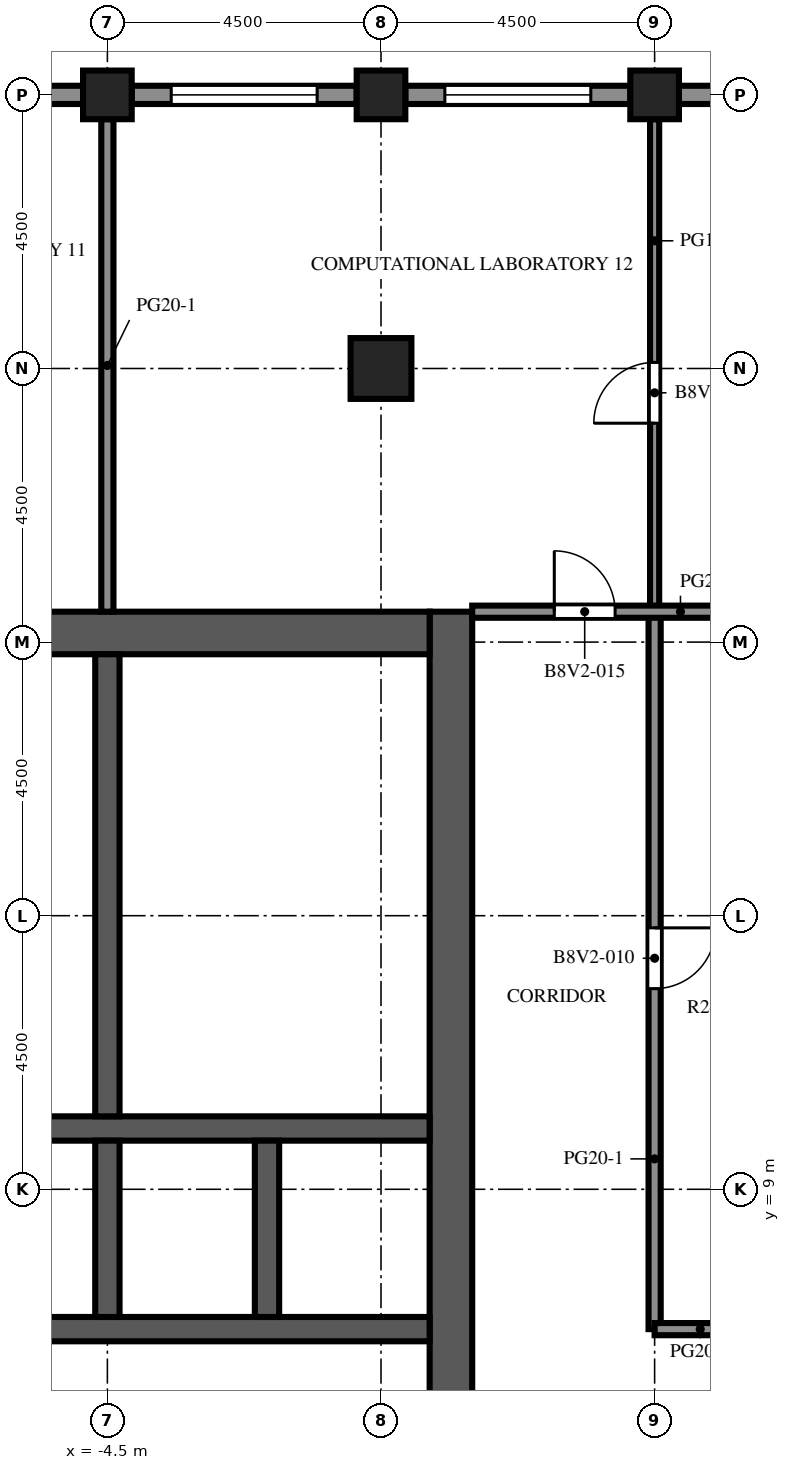
"""IFC4 building model, lengths in metres.
Left out: names, types, materials, properties, quantities, classifications, styles, units other than length and angle.
Written with IfcOpenShell. Run it as: python <this file> out.ifc"""

import sys

from ifc_helpers import new_model, si_unit, direction, frame, frame_2d, origin, origin_2d, place, context, subcontext, project, spatial, rectangle, extrude, element, fill, save


model = new_model("IFC4")
c1 = context("Model", 3, precision=1e-05, world=origin(), true_north=direction((0.0, 1.0)))
c2 = subcontext(c1, "Body", "Model", "MODEL_VIEW")
j1 = project(units=[si_unit("LENGTHUNIT", "METRE"), si_unit("PLANEANGLEUNIT", "RADIAN")], contexts=[c1])
p1 = place(None, origin())
s1 = spatial("IfcSite", under=j1, at=p1, CompositionType="ELEMENT")
p2 = place(p1, origin())
s2 = spatial("IfcBuilding", under=s1, at=p2, CompositionType="ELEMENT")
p3 = place(p2, frame((0.0, 0.0, 286.8)))
s3 = spatial("IfcBuildingStorey", under=s2, at=p3, CompositionType="ELEMENT", Elevation=286.8)
for number, where, z_axis, x_axis in (
    (1, (-4.5, 27.0, 0.0), (0.0, 0.0, 1.0), (1.0, 0.0, 0.0)),
    (2, (0.0, 27.0, 0.0), (0.0, 0.0, 1.0), (1.0, 0.0, 0.0)),
    (3, (4.5, 27.0, 0.0), (0.0, 0.0, 1.0), (1.0, 0.0, 0.0)),
):
    element("IfcColumn", number, at=place(p3, frame(where, z_axis=z_axis, x_axis=x_axis)), inside=s3, PredefinedType="COLUMN", context=c2, shape_type="SweptSolid", body=[
        extrude(rectangle(XDim=0.8, YDim=0.8, at=origin_2d()), origin(), (0.0, 0.0, 1.0), 4.1),
    ])
p4 = place(p3, frame((0.0, 22.5, 0.0), z_axis=(0.0, 0.0, 1.0), x_axis=(1.0, 0.0, 0.0)))
e4 = element("IfcColumn", 4, at=p4, inside=s3, PredefinedType="COLUMN", context=c2, shape_type="SweptSolid", body=[
    extrude(rectangle(XDim=1.0, YDim=1.0, at=origin_2d()), origin(), (0.0, 0.0, 1.0), 4.1),
])
p5 = place(p3, frame((1.15, -9.0, 0.0), z_axis=(0.0, 0.0, 1.0), x_axis=(0.0, 1.0, 0.0)))
e5 = element("IfcWall", 5, at=p5, inside=s3, PredefinedType="SHEAR", context=c2, shape_type="SweptSolid", body=[
    extrude(rectangle(XDim=27.5, YDim=0.7, at=frame_2d((13.75, 0.0))), origin(), (0.0, 0.0, 1.0), 4.1),
])
p6 = place(p5, frame((12.55, 0.0, 0.0)))
e6 = element("IfcOpeningElement", 6, at=p6, cuts=e5, PredefinedType="OPENING", context=c2, shape_type="SweptSolid", body=[
    extrude(rectangle(XDim=2.4, YDim=2.4, at=frame_2d((1.2, 1.2))), frame((0.0, 0.36, 0.0), z_axis=(0.0, -1.0, 0.0), x_axis=(1.0, 0.0, 0.0)), (0.0, 0.0, 1.0), 0.72),
])
p7 = place(p5, frame((3.9, 0.0, 0.0)))
e7 = element("IfcOpeningElement", 7, at=p7, cuts=e5, PredefinedType="OPENING", context=c2, shape_type="SweptSolid", body=[
    extrude(rectangle(XDim=1.2, YDim=2.1, at=frame_2d((0.6, 1.05))), frame((0.0, 0.36, 0.0), z_axis=(0.0, -1.0, 0.0), x_axis=(1.0, 0.0, 0.0)), (0.0, 0.0, 1.0), 0.72),
])
p8 = place(p5, frame((22.4, 0.0, 0.0)))
e8 = element("IfcOpeningElement", 8, at=p8, cuts=e5, PredefinedType="OPENING", context=c2, shape_type="SweptSolid", body=[
    extrude(rectangle(XDim=1.2, YDim=2.1, at=frame_2d((0.6, 1.05))), frame((0.0, 0.36, 0.0), z_axis=(0.0, -1.0, 0.0), x_axis=(1.0, 0.0, 0.0)), (0.0, 0.0, 1.0), 0.72),
])
p9 = place(p3, frame((-9.8, 18.15, 0.0), z_axis=(0.0, 0.0, 1.0), x_axis=(1.0, 0.0, 0.0)))
e9 = element("IfcWall", 9, at=p9, inside=s3, PredefinedType="SHEAR", context=c2, shape_type="SweptSolid", body=[
    extrude(rectangle(XDim=10.6, YDim=0.7, at=frame_2d((5.3, 0.0))), origin(), (0.0, 0.0, 1.0), 4.1),
])
p10 = place(p3, frame((-9.8, 6.7, 0.0), z_axis=(0.0, 0.0, 1.0), x_axis=(1.0, 0.0, 0.0)))
e10 = element("IfcWall", 10, at=p10, inside=s3, PredefinedType="SHEAR", context=c2, shape_type="SweptSolid", body=[
    extrude(rectangle(XDim=10.6, YDim=0.4, at=frame_2d((5.3, 0.0))), origin(), (0.0, 0.0, 1.0), 4.1),
])
p11 = place(p10, frame((3.438, 0.0, 0.0)))
e11 = element("IfcOpeningElement", 11, at=p11, cuts=e10, PredefinedType="OPENING", context=c2, shape_type="SweptSolid", body=[
    extrude(rectangle(XDim=1.1, YDim=2.1, at=frame_2d((0.55, 1.05))), frame((0.0, 0.21, 0.0), z_axis=(0.0, -1.0, 0.0), x_axis=(1.0, 0.0, 0.0)), (0.0, 0.0, 1.0), 0.42),
])
p12 = place(p10, frame((6.062, 0.0, 0.0)))
e12 = element("IfcOpeningElement", 12, at=p12, cuts=e10, PredefinedType="OPENING", context=c2, shape_type="SweptSolid", body=[
    extrude(rectangle(XDim=1.1, YDim=2.1, at=frame_2d((0.55, 1.05))), frame((0.0, 0.21, 0.0), z_axis=(0.0, -1.0, 0.0), x_axis=(1.0, 0.0, 0.0)), (0.0, 0.0, 1.0), 0.42),
])
p13 = place(p10, frame((8.812, 0.0, 0.0)))
e13 = element("IfcOpeningElement", 13, at=p13, cuts=e10, PredefinedType="OPENING", context=c2, shape_type="SweptSolid", body=[
    extrude(rectangle(XDim=1.1, YDim=2.1, at=frame_2d((0.55, 1.05))), frame((0.0, 0.21, 0.0), z_axis=(0.0, -1.0, 0.0), x_axis=(1.0, 0.0, 0.0)), (0.0, 0.0, 1.0), 0.42),
])
p14 = place(p10, frame((0.738, 0.0, 0.0)))
e14 = element("IfcOpeningElement", 14, at=p14, cuts=e10, PredefinedType="OPENING", context=c2, shape_type="SweptSolid", body=[
    extrude(rectangle(XDim=1.0, YDim=2.1, at=frame_2d((0.5, 1.05))), frame((0.0, 0.21, 0.0), z_axis=(0.0, -1.0, 0.0), x_axis=(1.0, 0.0, 0.0)), (0.0, 0.0, 1.0), 0.42),
])
p15 = place(p3, frame((-9.8, 10.0, 0.0), z_axis=(0.0, 0.0, 1.0), x_axis=(1.0, 0.0, 0.0)))
e15 = element("IfcWall", 15, at=p15, inside=s3, PredefinedType="SHEAR", context=c2, shape_type="SweptSolid", body=[
    extrude(rectangle(XDim=10.6, YDim=0.4, at=frame_2d((5.3, 0.0))), origin(), (0.0, 0.0, 1.0), 4.1),
])
for number, where, z_axis, x_axis in (
    (16, (-4.5, 6.9, 0.0), (0.0, 0.0, 1.0), (0.0, 1.0, 0.0)),
    (17, (-1.875, 6.9, 0.0), (0.0, 0.0, 1.0), (0.0, 1.0, 0.0)),
):
    element("IfcWall", number, at=place(p3, frame(where, z_axis=z_axis, x_axis=x_axis)), inside=s3, PredefinedType="SHEAR", context=c2, shape_type="SweptSolid", body=[
        extrude(rectangle(XDim=2.9, YDim=0.4, at=frame_2d((1.45, 0.0))), origin(), (0.0, 0.0, 1.0), 4.1),
    ])
p16 = place(p3, frame((-4.5, 10.2, 0.0), z_axis=(0.0, 0.0, 1.0), x_axis=(0.0, 1.0, 0.0)))
e18 = element("IfcWall", 18, at=p16, inside=s3, PredefinedType="SHEAR", context=c2, shape_type="SweptSolid", body=[
    extrude(rectangle(XDim=7.6, YDim=0.4, at=frame_2d((3.8, 0.0))), origin(), (0.0, 0.0, 1.0), 4.1),
])
p17 = place(p3, frame((4.9, 27.0, 0.0), z_axis=(0.0, 0.0, 1.0), x_axis=(1.0, 0.0, 0.0)))
e19 = element("IfcWall", 19, at=p17, inside=s3, PredefinedType="SOLIDWALL", context=c2, shape_type="SweptSolid", body=[
    extrude(rectangle(XDim=3.7, YDim=0.3, at=frame_2d((1.85, 0.0))), origin(), (0.0, 0.0, 1.0), 2.85),
])
p18 = place(p17, frame((0.65, 0.0, 0.8)))
e20 = element("IfcOpeningElement", 20, at=p18, cuts=e19, PredefinedType="OPENING", context=c2, shape_type="SweptSolid", body=[
    extrude(rectangle(XDim=2.4, YDim=1.7, at=frame_2d((1.2, 0.85))), frame((0.0, 0.16, 0.0), z_axis=(0.0, -1.0, 0.0), x_axis=(1.0, 0.0, 0.0)), (0.0, 0.0, 1.0), 0.32),
])
p19 = place(p3, frame((0.4, 27.0, 0.0), z_axis=(0.0, 0.0, 1.0), x_axis=(1.0, 0.0, 0.0)))
e21 = element("IfcWall", 21, at=p19, inside=s3, PredefinedType="SOLIDWALL", context=c2, shape_type="SweptSolid", body=[
    extrude(rectangle(XDim=3.7, YDim=0.3, at=frame_2d((1.85, 0.0))), origin(), (0.0, 0.0, 1.0), 2.85),
])
p20 = place(p19, frame((0.65, 0.0, 0.8)))
e22 = element("IfcOpeningElement", 22, at=p20, cuts=e21, PredefinedType="OPENING", context=c2, shape_type="SweptSolid", body=[
    extrude(rectangle(XDim=2.4, YDim=1.7, at=frame_2d((1.2, 0.85))), frame((0.0, 0.16, 0.0), z_axis=(0.0, -1.0, 0.0), x_axis=(1.0, 0.0, 0.0)), (0.0, 0.0, 1.0), 0.32),
])
p21 = place(p3, frame((-4.1, 27.0, 0.0), z_axis=(0.0, 0.0, 1.0), x_axis=(1.0, 0.0, 0.0)))
e23 = element("IfcWall", 23, at=p21, inside=s3, PredefinedType="SOLIDWALL", context=c2, shape_type="SweptSolid", body=[
    extrude(rectangle(XDim=3.7, YDim=0.3, at=frame_2d((1.85, 0.0))), origin(), (0.0, 0.0, 1.0), 2.85),
])
p22 = place(p21, frame((0.65, 0.0, 0.8)))
e24 = element("IfcOpeningElement", 24, at=p22, cuts=e23, PredefinedType="OPENING", context=c2, shape_type="SweptSolid", body=[
    extrude(rectangle(XDim=2.4, YDim=1.7, at=frame_2d((1.2, 0.85))), frame((0.0, 0.16, 0.0), z_axis=(0.0, -1.0, 0.0), x_axis=(1.0, 0.0, 0.0)), (0.0, 0.0, 1.0), 0.32),
])
p23 = place(p3, frame((-8.6, 27.0, 0.0), z_axis=(0.0, 0.0, 1.0), x_axis=(1.0, 0.0, 0.0)))
e25 = element("IfcWall", 25, at=p23, inside=s3, PredefinedType="SOLIDWALL", context=c2, shape_type="SweptSolid", body=[
    extrude(rectangle(XDim=3.7, YDim=0.3, at=frame_2d((1.85, 0.0))), origin(), (0.0, 0.0, 1.0), 2.85),
])
p24 = place(p23, frame((0.65, 0.0, 0.8)))
e26 = element("IfcOpeningElement", 26, at=p24, cuts=e25, PredefinedType="OPENING", context=c2, shape_type="SweptSolid", body=[
    extrude(rectangle(XDim=2.4, YDim=1.7, at=frame_2d((1.2, 0.85))), frame((0.0, 0.16, 0.0), z_axis=(0.0, -1.0, 0.0), x_axis=(1.0, 0.0, 0.0)), (0.0, 0.0, 1.0), 0.32),
])
p25 = place(p3, frame((-0.6, 10.2, 0.0), z_axis=(0.0, 0.0, 1.0), x_axis=(0.0, 1.0, 0.0)))
e27 = element("IfcWall", 27, at=p25, inside=s3, PredefinedType="PARTITIONING", context=c2, shape_type="SweptSolid", body=[
    extrude(rectangle(XDim=2.28, YDim=0.1, at=frame_2d((1.14, 0.0))), origin(), (0.0, 0.0, 1.0), 3.65),
])
p26 = place(p25, frame((0.64, 0.0, 0.0)))
e28 = element("IfcOpeningElement", 28, at=p26, cuts=e27, PredefinedType="OPENING", context=c2, shape_type="SweptSolid", body=[
    extrude(rectangle(XDim=1.0, YDim=2.1, at=frame_2d((0.5, 1.05))), frame((0.0, 0.06, 0.0), z_axis=(0.0, -1.0, 0.0), x_axis=(1.0, 0.0, 0.0)), (0.0, 0.0, 1.0), 0.12),
])
p27 = place(p3, frame((-0.6, 12.48, 0.0), z_axis=(0.0, 0.0, 1.0), x_axis=(0.0, 1.0, 0.0)))
e29 = element("IfcWall", 29, at=p27, inside=s3, PredefinedType="PARTITIONING", context=c2, shape_type="SweptSolid", body=[
    extrude(rectangle(XDim=2.432, YDim=0.1, at=frame_2d((1.216, 0.0))), origin(), (0.0, 0.0, 1.0), 3.65),
])
p28 = place(p27, frame((0.716, 0.0, 0.0)))
e30 = element("IfcOpeningElement", 30, at=p28, cuts=e29, PredefinedType="OPENING", context=c2, shape_type="SweptSolid", body=[
    extrude(rectangle(XDim=1.0, YDim=2.1, at=frame_2d((0.5, 1.05))), frame((0.0, 0.06, 0.0), z_axis=(0.0, -1.0, 0.0), x_axis=(1.0, 0.0, 0.0)), (0.0, 0.0, 1.0), 0.12),
])
p29 = place(p3, frame((-0.6, 14.912, 0.0), z_axis=(0.0, 0.0, 1.0), x_axis=(0.0, 1.0, 0.0)))
e31 = element("IfcWall", 31, at=p29, inside=s3, PredefinedType="PARTITIONING", context=c2, shape_type="SweptSolid", body=[
    extrude(rectangle(XDim=2.888, YDim=0.1, at=frame_2d((1.444, 0.0))), origin(), (0.0, 0.0, 1.0), 3.65),
])
p30 = place(p29, frame((0.944, 0.0, 0.0)))
e32 = element("IfcOpeningElement", 32, at=p30, cuts=e31, PredefinedType="OPENING", context=c2, shape_type="SweptSolid", body=[
    extrude(rectangle(XDim=1.0, YDim=2.1, at=frame_2d((0.5, 1.05))), frame((0.0, 0.06, 0.0), z_axis=(0.0, -1.0, 0.0), x_axis=(1.0, 0.0, 0.0)), (0.0, 0.0, 1.0), 0.12),
])
for number, where, z_axis, x_axis in (
    (33, (-4.3, 12.48, 0.0), (0.0, 0.0, 1.0), (1.0, 0.0, 0.0)),
    (34, (-4.3, 14.912, 0.0), (0.0, 0.0, 1.0), (1.0, 0.0, 0.0)),
):
    element("IfcWall", number, at=place(p3, frame(where, z_axis=z_axis, x_axis=x_axis)), inside=s3, PredefinedType="PARTITIONING", context=c2, shape_type="SweptSolid", body=[
        extrude(rectangle(XDim=3.7, YDim=0.1, at=frame_2d((1.85, 0.0))), origin(), (0.0, 0.0, 1.0), 3.65),
    ])
p31 = place(p3, frame((-4.5, 18.5, 0.0), z_axis=(0.0, 0.0, 1.0), x_axis=(0.0, 1.0, 0.0)))
e35 = element("IfcWall", 35, at=p31, inside=s3, PredefinedType="PARTITIONING", context=c2, shape_type="SweptSolid", body=[
    extrude(rectangle(XDim=8.1, YDim=0.2, at=frame_2d((4.05, 0.0))), origin(), (0.0, 0.0, 1.0), 3.65),
])
p32 = place(p3, frame((4.5, 26.6, 0.0), z_axis=(0.0, 0.0, 1.0), x_axis=(0.0, -1.0, 0.0)))
e36 = element("IfcWall", 36, at=p32, inside=s3, PredefinedType="PARTITIONING", context=c2, shape_type="SweptSolid", body=[
    extrude(rectangle(XDim=8.1, YDim=0.15, at=frame_2d((4.05, 0.0))), origin(), (0.0, 0.0, 1.0), 3.65),
])
p33 = place(p32, frame((4.0, 0.0, 0.0)))
e37 = element("IfcOpeningElement", 37, at=p33, cuts=e36, PredefinedType="OPENING", context=c2, shape_type="SweptSolid", body=[
    extrude(rectangle(XDim=1.0, YDim=2.1, at=frame_2d((0.5, 1.05))), frame((0.0, 0.085, 0.0), z_axis=(0.0, -1.0, 0.0), x_axis=(1.0, 0.0, 0.0)), (0.0, 0.0, 1.0), 0.17),
])
p34 = place(p3, frame((4.5, 18.5, 0.0), z_axis=(0.0, 0.0, 1.0), x_axis=(0.0, -1.0, 0.0)))
e38 = element("IfcWall", 38, at=p34, inside=s3, PredefinedType="PARTITIONING", context=c2, shape_type="SweptSolid", body=[
    extrude(rectangle(XDim=11.8, YDim=0.2, at=frame_2d((5.9, 0.0))), origin(), (0.0, 0.0, 1.0), 3.65),
])
p35 = place(p34, frame((5.2, 0.0, 0.0)))
e39 = element("IfcOpeningElement", 39, at=p35, cuts=e38, PredefinedType="OPENING", context=c2, shape_type="SweptSolid", body=[
    extrude(rectangle(XDim=1.0, YDim=2.1, at=frame_2d((0.5, 1.05))), frame((0.0, 0.11, 0.0), z_axis=(0.0, -1.0, 0.0), x_axis=(1.0, 0.0, 0.0)), (0.0, 0.0, 1.0), 0.22),
])
p36 = place(p3, frame((4.5, 6.7, 0.0), z_axis=(0.0, 0.0, 1.0), x_axis=(1.0, 0.0, 0.0)))
e40 = element("IfcWall", 40, at=p36, inside=s3, PredefinedType="PARTITIONING", context=c2, shape_type="SweptSolid", body=[
    extrude(rectangle(XDim=1.5, YDim=0.2, at=frame_2d((0.75, 0.0))), origin(), (0.0, 0.0, 1.0), 3.65),
])
p37 = place(p3, frame((1.5, 18.5, 0.0), z_axis=(0.0, 0.0, 1.0), x_axis=(1.0, 0.0, 0.0)))
e41 = element("IfcWall", 41, at=p37, inside=s3, PredefinedType="PARTITIONING", context=c2, shape_type="SweptSolid", body=[
    extrude(rectangle(XDim=4.5, YDim=0.2, at=frame_2d((2.25, 0.0))), origin(), (0.0, 0.0, 1.0), 3.65),
])
p38 = place(p37, frame((1.35, 0.0, 0.0)))
e42 = element("IfcOpeningElement", 42, at=p38, cuts=e41, PredefinedType="OPENING", context=c2, shape_type="SweptSolid", body=[
    extrude(rectangle(XDim=1.0, YDim=2.1, at=frame_2d((0.5, 1.05))), frame((0.0, 0.11, 0.0), z_axis=(0.0, -1.0, 0.0), x_axis=(1.0, 0.0, 0.0)), (0.0, 0.0, 1.0), 0.22),
])
p39 = place(p20, origin())
e43 = element("IfcWindow", 43, at=p39, inside=s3, PartitioningType="SINGLE_PANEL", PredefinedType="WINDOW", context=c2, shape_type="SweptSolid", body=[
    extrude(rectangle(XDim=2.4, YDim=1.7, at=frame_2d((1.2, 0.85))), frame((0.0, 0.03, 0.0), z_axis=(0.0, -1.0, 0.0), x_axis=(1.0, 0.0, 0.0)), (0.0, 0.0, 1.0), 0.06),
])
fill(e22, e43)
p40 = place(p22, origin())
e44 = element("IfcWindow", 44, at=p40, inside=s3, PartitioningType="SINGLE_PANEL", PredefinedType="WINDOW", context=c2, shape_type="SweptSolid", body=[
    extrude(rectangle(XDim=2.4, YDim=1.7, at=frame_2d((1.2, 0.85))), frame((0.0, 0.03, 0.0), z_axis=(0.0, -1.0, 0.0), x_axis=(1.0, 0.0, 0.0)), (0.0, 0.0, 1.0), 0.06),
])
fill(e24, e44)
p41 = place(p11, origin())
e45 = element("IfcDoor", 45, at=p41, inside=s3, OperationType="DOUBLE_DOOR_SLIDING", PredefinedType="DOOR", context=c2, shape_type="SweptSolid", body=[
    extrude(rectangle(XDim=1.1, YDim=2.1, at=frame_2d((0.55, 1.05))), frame((0.0, 0.025, 0.0), z_axis=(0.0, -1.0, 0.0), x_axis=(1.0, 0.0, 0.0)), (0.0, 0.0, 1.0), 0.05),
])
fill(e11, e45)
p42 = place(p12, origin())
e46 = element("IfcDoor", 46, at=p42, inside=s3, OperationType="DOUBLE_DOOR_SLIDING", PredefinedType="DOOR", context=c2, shape_type="SweptSolid", body=[
    extrude(rectangle(XDim=1.1, YDim=2.1, at=frame_2d((0.55, 1.05))), frame((0.0, 0.025, 0.0), z_axis=(0.0, -1.0, 0.0), x_axis=(1.0, 0.0, 0.0)), (0.0, 0.0, 1.0), 0.05),
])
fill(e12, e46)
p43 = place(p13, origin())
e47 = element("IfcDoor", 47, at=p43, inside=s3, OperationType="DOUBLE_DOOR_SLIDING", PredefinedType="DOOR", context=c2, shape_type="SweptSolid", body=[
    extrude(rectangle(XDim=1.1, YDim=2.1, at=frame_2d((0.55, 1.05))), frame((0.0, 0.025, 0.0), z_axis=(0.0, -1.0, 0.0), x_axis=(1.0, 0.0, 0.0)), (0.0, 0.0, 1.0), 0.05),
])
fill(e13, e47)
p44 = place(p6, origin())
e48 = element("IfcDoor", 48, at=p44, inside=s3, OperationType="DOUBLE_DOOR_DOUBLE_SWING", PredefinedType="DOOR", context=c2, shape_type="SweptSolid", body=[
    extrude(rectangle(XDim=2.4, YDim=2.4, at=frame_2d((1.2, 1.2))), frame((0.0, 0.025, 0.0), z_axis=(0.0, -1.0, 0.0), x_axis=(1.0, 0.0, 0.0)), (0.0, 0.0, 1.0), 0.05),
])
fill(e6, e48)
p45 = place(p8, origin())
e49 = element("IfcDoor", 49, at=p45, inside=s3, OperationType="SINGLE_SWING_LEFT", PredefinedType="DOOR", context=c2, shape_type="SweptSolid", body=[
    extrude(rectangle(XDim=1.2, YDim=2.1, at=frame_2d((0.6, 1.05))), frame((0.0, 0.325, 0.0), z_axis=(0.0, -1.0, 0.0), x_axis=(1.0, 0.0, 0.0)), (0.0, 0.0, 1.0), 0.05),
])
fill(e8, e49)
p46 = place(p26, origin())
e50 = element("IfcDoor", 50, at=p46, inside=s3, OperationType="SINGLE_SWING_RIGHT", PredefinedType="DOOR", context=c2, shape_type="SweptSolid", body=[
    extrude(rectangle(XDim=1.0, YDim=2.1, at=frame_2d((0.5, 1.05))), frame((0.0, 0.025, 0.0), z_axis=(0.0, -1.0, 0.0), x_axis=(1.0, 0.0, 0.0)), (0.0, 0.0, 1.0), 0.05),
])
fill(e28, e50)
p47 = place(p28, origin())
e51 = element("IfcDoor", 51, at=p47, inside=s3, OperationType="SINGLE_SWING_LEFT", PredefinedType="DOOR", context=c2, shape_type="SweptSolid", body=[
    extrude(rectangle(XDim=1.0, YDim=2.1, at=frame_2d((0.5, 1.05))), frame((0.0, 0.025, 0.0), z_axis=(0.0, -1.0, 0.0), x_axis=(1.0, 0.0, 0.0)), (0.0, 0.0, 1.0), 0.05),
])
fill(e30, e51)
p48 = place(p30, origin())
e52 = element("IfcDoor", 52, at=p48, inside=s3, OperationType="SINGLE_SWING_RIGHT", PredefinedType="DOOR", context=c2, shape_type="SweptSolid", body=[
    extrude(rectangle(XDim=1.0, YDim=2.1, at=frame_2d((0.5, 1.05))), frame((0.0, 0.025, 0.0), z_axis=(0.0, -1.0, 0.0), x_axis=(1.0, 0.0, 0.0)), (0.0, 0.0, 1.0), 0.05),
])
fill(e32, e52)
p49 = place(p35, origin())
e53 = element("IfcDoor", 53, at=p49, inside=s3, OperationType="SINGLE_SWING_LEFT", PredefinedType="DOOR", context=c2, shape_type="SweptSolid", body=[
    extrude(rectangle(XDim=1.0, YDim=2.1, at=frame_2d((0.5, 1.05))), frame((0.0, 0.025, 0.0), z_axis=(0.0, -1.0, 0.0), x_axis=(1.0, 0.0, 0.0)), (0.0, 0.0, 1.0), 0.05),
])
fill(e39, e53)
p50 = place(p33, origin())
e54 = element("IfcDoor", 54, at=p50, inside=s3, OperationType="SINGLE_SWING_RIGHT", PredefinedType="DOOR", context=c2, shape_type="SweptSolid", body=[
    extrude(rectangle(XDim=1.0, YDim=2.1, at=frame_2d((0.5, 1.05))), frame((0.0, 0.025, 0.0), z_axis=(0.0, -1.0, 0.0), x_axis=(1.0, 0.0, 0.0)), (0.0, 0.0, 1.0), 0.05),
])
fill(e37, e54)
p51 = place(p38, origin())
e55 = element("IfcDoor", 55, at=p51, inside=s3, OperationType="SINGLE_SWING_LEFT", PredefinedType="DOOR", context=c2, shape_type="SweptSolid", body=[
    extrude(rectangle(XDim=1.0, YDim=2.1, at=frame_2d((0.5, 1.05))), frame((0.0, 0.025, 0.0), z_axis=(0.0, -1.0, 0.0), x_axis=(1.0, 0.0, 0.0)), (0.0, 0.0, 1.0), 0.05),
])
fill(e42, e55)
save(model, sys.argv[1])
